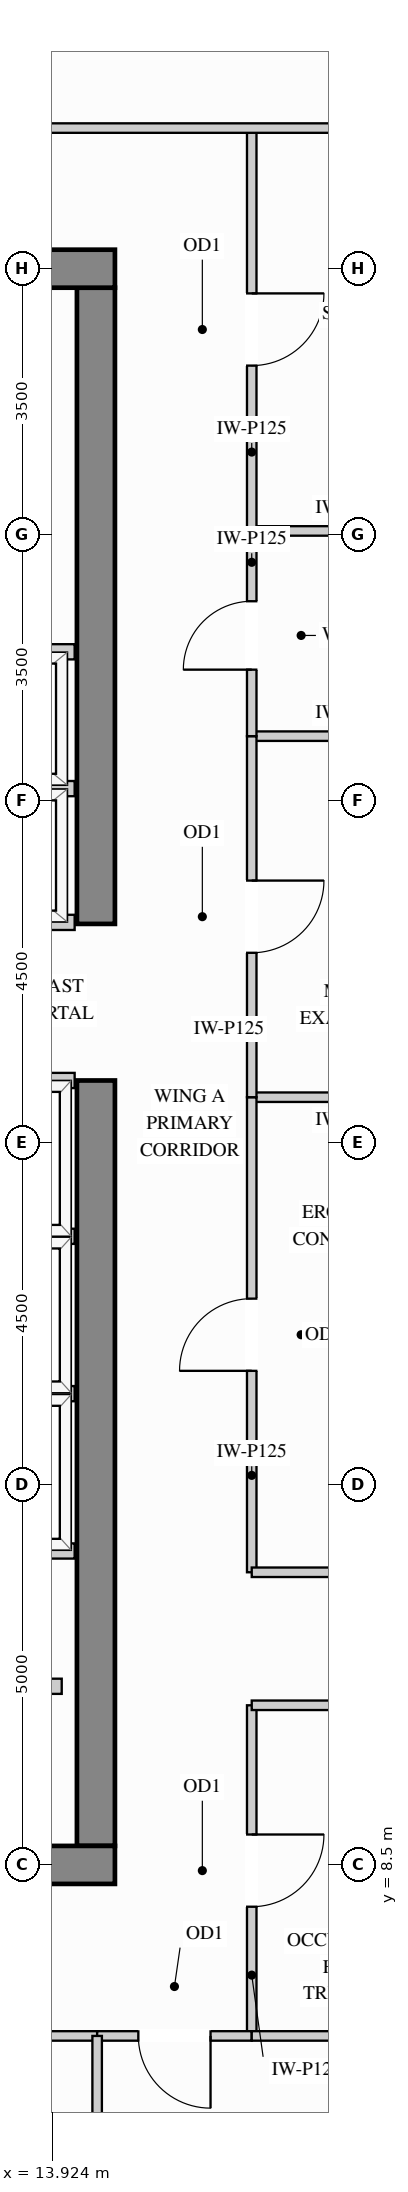
"""IFC4 building model, lengths in metres.
Left out: names, types, materials, properties, quantities, classifications, styles, units other than length and angle.
Written with IfcOpenShell. Run it as: python <this file> out.ifc"""

import sys

from ifc_helpers import new_model, si_unit, direction, frame, frame_2d, origin, place, context, subcontext, project, spatial, rectangle, extrude, source, transform, mapped, element, fill, save


model = new_model("IFC4")
c1 = context("Model", 3, precision=1e-05, world=origin(), true_north=direction((0.0, 1.0)))
c2 = subcontext(c1, "Body", "Model", "MODEL_VIEW")
j1 = project(units=[si_unit("LENGTHUNIT", "METRE"), si_unit("PLANEANGLEUNIT", "RADIAN")], contexts=[c1])
p1 = place(None, origin())
s1 = spatial("IfcSite", under=j1, at=p1, CompositionType="ELEMENT")
p2 = place(p1, origin())
s2 = spatial("IfcBuilding", under=s1, at=p2, CompositionType="ELEMENT")
p3 = place(p2, frame((0.0, 0.0, 226.8)))
s3 = spatial("IfcBuildingStorey", under=s2, at=p3, CompositionType="ELEMENT", Elevation=226.8)
m1 = source(origin(), c2, "Body", "SweptSolid", [
    extrude(rectangle(XDim=10.07, YDim=0.5, at=frame_2d((5.035, 0.0))), origin(), (0.0, 0.0, 1.0), 3.4),
])
p4 = place(p3, frame((14.5, 8.75, 0.0), z_axis=(0.0, 0.0, 1.0), x_axis=(0.0, 1.0, 0.0)))
e1 = element("IfcWall", 1, at=p4, inside=s3, PredefinedType="SHEAR", context=c2, shape_type="MappedRepresentation", body=[
    mapped(m1, transform((0.0, 0.0, 0.0), x_axis=(1.0, 0.0, 0.0), y_axis=(0.0, 1.0, 0.0), z_axis=(0.0, 0.0, 1.0))),
])
m2 = source(origin(), c2, "Body", "SweptSolid", [
    extrude(rectangle(XDim=8.37, YDim=0.5, at=frame_2d((4.185, 0.0))), origin(), (0.0, 0.0, 1.0), 3.4),
])
p5 = place(p3, frame((14.5, 20.88, 0.0), z_axis=(0.0, 0.0, 1.0), x_axis=(0.0, 1.0, 0.0)))
e2 = element("IfcWall", 2, at=p5, inside=s3, PredefinedType="SHEAR", context=c2, shape_type="MappedRepresentation", body=[
    mapped(m2, transform((0.0, 0.0, 0.0), x_axis=(1.0, 0.0, 0.0), y_axis=(0.0, 1.0, 0.0), z_axis=(0.0, 0.0, 1.0))),
])
m3 = source(origin(), c2, "Body", "SweptSolid", [
    extrude(rectangle(XDim=10.5, YDim=0.5, at=frame_2d((5.25, 0.0))), origin(), (0.0, 0.0, 1.0), 3.4),
])
for number, where, z_axis, x_axis in (
    (3, (4.25, 29.5, 0.0), (0.0, 0.0, 1.0), (1.0, 0.0, 0.0)),
    (4, (4.25, 8.5, 0.0), (0.0, 0.0, 1.0), (1.0, 0.0, 0.0)),
):
    element("IfcWall", number, at=place(p3, frame(where, z_axis=z_axis, x_axis=x_axis)), inside=s3, PredefinedType="SHEAR", context=c2, shape_type="MappedRepresentation", body=[
        mapped(m3, transform((0.0, 0.0, 0.0), x_axis=(1.0, 0.0, 0.0), y_axis=(0.0, 1.0, 0.0), z_axis=(0.0, 0.0, 1.0))),
    ])
m4 = source(origin(), c2, "Body", "SweptSolid", [
    extrude(rectangle(XDim=2.598, YDim=0.125, at=frame_2d((1.299, 0.0))), origin(), (0.0, 0.0, 1.0), 3.385),
])
for number, where, z_axis, x_axis in (
    (5, (16.55, 18.6, 0.0), (0.0, 0.0, 1.0), (1.0, 0.0, 0.0)),
    (6, (16.55, 23.35, 0.0), (0.0, 0.0, 1.0), (1.0, 0.0, 0.0)),
    (7, (16.55, 26.05, 0.0), (0.0, 0.0, 1.0), (1.0, 0.0, 0.0)),
):
    element("IfcWall", number, at=place(p3, frame(where, z_axis=z_axis, x_axis=x_axis)), inside=s3, PredefinedType="PARTITIONING", context=c2, shape_type="MappedRepresentation", body=[
        mapped(m4, transform((0.0, 0.0, 0.0), x_axis=(1.0, 0.0, 0.0), y_axis=(0.0, 1.0, 0.0), z_axis=(0.0, 0.0, 1.0))),
    ])
p6 = place(p3, frame((16.55, 12.35, 0.0), z_axis=(0.0, 0.0, 1.0), x_axis=(0.0, 1.0, 0.0)))
e8 = element("IfcWall", 8, at=p6, inside=s3, PredefinedType="PARTITIONING", context=c2, shape_type="SweptSolid", body=[
    extrude(rectangle(XDim=6.25, YDim=0.125, at=frame_2d((3.125, 0.0))), origin(), (0.0, 0.0, 1.0), 3.385),
])
p7 = place(p6, frame((2.65, 0.0, 0.0)))
e9 = element("IfcOpeningElement", 9, at=p7, cuts=e8, PredefinedType="OPENING", context=c2, shape_type="SweptSolid", body=[
    extrude(rectangle(XDim=0.95, YDim=2.15, at=frame_2d((0.475, 1.075))), frame((0.0, 0.073, 0.0), z_axis=(0.0, -1.0, 0.0), x_axis=(1.0, 0.0, 0.0)), (0.0, 0.0, 1.0), 0.145),
])
p8 = place(p3, frame((16.55, 18.6, 0.0), z_axis=(0.0, 0.0, 1.0), x_axis=(0.0, 1.0, 0.0)))
e10 = element("IfcWall", 10, at=p8, inside=s3, PredefinedType="PARTITIONING", context=c2, shape_type="SweptSolid", body=[
    extrude(rectangle(XDim=4.75, YDim=0.125, at=frame_2d((2.375, 0.0))), origin(), (0.0, 0.0, 1.0), 3.385),
])
p9 = place(p8, frame((1.9, 0.0, 0.0)))
e11 = element("IfcOpeningElement", 11, at=p9, cuts=e10, PredefinedType="OPENING", context=c2, shape_type="SweptSolid", body=[
    extrude(rectangle(XDim=0.95, YDim=2.15, at=frame_2d((0.475, 1.075))), frame((0.0, 0.073, 0.0), z_axis=(0.0, -1.0, 0.0), x_axis=(1.0, 0.0, 0.0)), (0.0, 0.0, 1.0), 0.145),
])
p10 = place(p3, frame((16.55, 26.05, 0.0), z_axis=(0.0, 0.0, 1.0), x_axis=(0.0, 1.0, 0.0)))
e12 = element("IfcWall", 12, at=p10, inside=s3, PredefinedType="PARTITIONING", context=c2, shape_type="SweptSolid", body=[
    extrude(rectangle(XDim=5.3, YDim=0.125, at=frame_2d((2.65, 0.0))), origin(), (0.0, 0.0, 1.0), 3.385),
])
p11 = place(p10, frame((2.175, 0.0, 0.0)))
e13 = element("IfcOpeningElement", 13, at=p11, cuts=e12, PredefinedType="OPENING", context=c2, shape_type="SweptSolid", body=[
    extrude(rectangle(XDim=0.95, YDim=2.15, at=frame_2d((0.475, 1.075))), frame((0.0, 0.073, 0.0), z_axis=(0.0, -1.0, 0.0), x_axis=(1.0, 0.0, 0.0)), (0.0, 0.0, 1.0), 0.145),
])
p12 = place(p3, frame((16.55, 6.25, 0.0), z_axis=(0.0, 0.0, 1.0), x_axis=(0.0, 1.0, 0.0)))
e14 = element("IfcWall", 14, at=p12, inside=s3, PredefinedType="PARTITIONING", context=c2, shape_type="SweptSolid", body=[
    extrude(rectangle(XDim=4.35, YDim=0.125, at=frame_2d((2.175, 0.0))), origin(), (0.0, 0.0, 1.0), 3.385),
])
p13 = place(p12, frame((1.7, 0.0, 0.0)))
e15 = element("IfcOpeningElement", 15, at=p13, cuts=e14, PredefinedType="OPENING", context=c2, shape_type="SweptSolid", body=[
    extrude(rectangle(XDim=0.95, YDim=2.15, at=frame_2d((0.475, 1.075))), frame((0.0, 0.073, 0.0), z_axis=(0.0, -1.0, 0.0), x_axis=(1.0, 0.0, 0.0)), (0.0, 0.0, 1.0), 0.145),
])
p14 = place(p3, frame((16.55, 23.35, 0.0), z_axis=(0.0, 0.0, 1.0), x_axis=(0.0, 1.0, 0.0)))
e16 = element("IfcWall", 16, at=p14, inside=s3, PredefinedType="PARTITIONING", context=c2, shape_type="SweptSolid", body=[
    extrude(rectangle(XDim=2.7, YDim=0.125, at=frame_2d((1.35, 0.0))), origin(), (0.0, 0.0, 1.0), 3.385),
])
p15 = place(p14, frame((0.875, 0.0, 0.0)))
e17 = element("IfcOpeningElement", 17, at=p15, cuts=e16, PredefinedType="OPENING", context=c2, shape_type="SweptSolid", body=[
    extrude(rectangle(XDim=0.9, YDim=2.15, at=frame_2d((0.45, 1.075))), frame((0.0, 0.073, 0.0), z_axis=(0.0, -1.0, 0.0), x_axis=(1.0, 0.0, 0.0)), (0.0, 0.0, 1.0), 0.145),
])
m5 = source(origin(), c2, "Body", "SweptSolid", [
    extrude(rectangle(XDim=7.498, YDim=0.125, at=frame_2d((3.749, 0.0))), origin(), (0.0, 0.0, 1.0), 3.385),
])
p16 = place(p3, frame((11.65, 31.35, 0.0), z_axis=(0.0, 0.0, 1.0), x_axis=(1.0, 0.0, 0.0)))
e18 = element("IfcWall", 18, at=p16, inside=s3, PredefinedType="PARTITIONING", context=c2, shape_type="MappedRepresentation", body=[
    mapped(m5, transform((0.0, 0.0, 0.0), x_axis=(1.0, 0.0, 0.0), y_axis=(0.0, 1.0, 0.0), z_axis=(0.0, 0.0, 1.0))),
])
m6 = source(origin(), c2, "Body", "SweptSolid", [
    extrude(rectangle(XDim=2.95, YDim=0.125, at=frame_2d((1.475, 0.0))), origin(), (0.0, 0.0, 1.0), 3.385),
])
for number, where, z_axis, x_axis in (
    (19, (16.55, 12.35, 0.0), (0.0, 0.0, 1.0), (1.0, 0.0, 0.0)),
    (20, (16.55, 10.6, 0.0), (0.0, 0.0, 1.0), (1.0, 0.0, 0.0)),
):
    element("IfcWall", number, at=place(p3, frame(where, z_axis=z_axis, x_axis=x_axis)), inside=s3, PredefinedType="PARTITIONING", context=c2, shape_type="MappedRepresentation", body=[
        mapped(m6, transform((0.0, 0.0, 0.0), x_axis=(1.0, 0.0, 0.0), y_axis=(0.0, 1.0, 0.0), z_axis=(0.0, 0.0, 1.0))),
    ])
p17 = place(p3, frame((8.889, 6.25, 0.0), z_axis=(0.0, 0.0, 1.0), x_axis=(1.0, 0.0, 0.0)))
e21 = element("IfcWall", 21, at=p17, inside=s3, PredefinedType="PARTITIONING", context=c2, shape_type="SweptSolid", body=[
    extrude(rectangle(XDim=5.627, YDim=0.125, at=frame_2d((2.813, 0.0))), origin(), (0.0, 0.0, 1.0), 2.848),
])
p18 = place(p17, frame((2.338, 0.0, 0.0)))
e22 = element("IfcOpeningElement", 22, at=p18, cuts=e21, PredefinedType="OPENING", context=c2, shape_type="SweptSolid", body=[
    extrude(rectangle(XDim=0.95, YDim=2.15, at=frame_2d((0.475, 1.075))), frame((0.0, 0.073, 0.0), z_axis=(0.0, -1.0, 0.0), x_axis=(1.0, 0.0, 0.0)), (0.0, 0.0, 1.0), 0.145),
])
p19 = place(p3, frame((14.516, 6.25, 0.0), z_axis=(0.0, 0.0, 1.0), x_axis=(1.0, 0.0, 0.0)))
e23 = element("IfcWall", 23, at=p19, inside=s3, PredefinedType="PARTITIONING", context=c2, shape_type="SweptSolid", body=[
    extrude(rectangle(XDim=2.034, YDim=0.125, at=frame_2d((1.017, 0.0))), origin(), (0.0, 0.0, 1.0), 2.848),
])
p20 = place(p19, frame((0.542, 0.0, 0.0)))
e24 = element("IfcOpeningElement", 24, at=p20, cuts=e23, PredefinedType="OPENING", context=c2, shape_type="SweptSolid", body=[
    extrude(rectangle(XDim=0.95, YDim=2.15, at=frame_2d((0.475, 1.075))), frame((0.0, 0.073, 0.0), z_axis=(0.0, -1.0, 0.0), x_axis=(1.0, 0.0, 0.0)), (0.0, 0.0, 1.0), 0.145),
])
m7 = source(origin(), c2, "Body", "SweptSolid", [
    extrude(rectangle(XDim=2.598, YDim=0.125, at=frame_2d((1.299, 0.0))), origin(), (0.0, 0.0, 1.0), 2.848),
])
p21 = place(p3, frame((16.55, 6.25, 0.0), z_axis=(0.0, 0.0, 1.0), x_axis=(1.0, 0.0, 0.0)))
e25 = element("IfcWall", 25, at=p21, inside=s3, PredefinedType="PARTITIONING", context=c2, shape_type="MappedRepresentation", body=[
    mapped(m7, transform((0.0, 0.0, 0.0), x_axis=(1.0, 0.0, 0.0), y_axis=(0.0, 1.0, 0.0), z_axis=(0.0, 0.0, 1.0))),
])
m8 = source(origin(), c2, "Body", "SweptSolid", [
    extrude(rectangle(XDim=5.2, YDim=0.125, at=frame_2d((2.6, 0.0))), origin(), (0.0, 0.0, 1.0), 3.385),
])
p22 = place(p3, frame((14.516, 1.05, 0.0), z_axis=(0.0, 0.0, 1.0), x_axis=(0.0, 1.0, 0.0)))
e26 = element("IfcWall", 26, at=p22, inside=s3, PredefinedType="PARTITIONING", context=c2, shape_type="MappedRepresentation", body=[
    mapped(m8, transform((0.0, 0.0, 0.0), x_axis=(1.0, 0.0, 0.0), y_axis=(0.0, 1.0, 0.0), z_axis=(0.0, 0.0, 1.0))),
])
m9 = source(origin(), c2, "Body", "SweptSolid", [
    extrude(rectangle(XDim=1.63, YDim=0.2, at=frame_2d((0.815, 0.0))), origin(), (0.0, 0.0, 1.0), 3.385),
])
p23 = place(p3, frame((12.42, 10.85, 0.0), z_axis=(0.0, 0.0, 1.0), x_axis=(1.0, 0.0, 0.0)))
e27 = element("IfcWall", 27, at=p23, inside=s3, PredefinedType="PARTITIONING", context=c2, shape_type="MappedRepresentation", body=[
    mapped(m9, transform((0.0, 0.0, 0.0), x_axis=(1.0, 0.0, 0.0), y_axis=(0.0, 1.0, 0.0), z_axis=(0.0, 0.0, 1.0))),
])
m10 = source(origin(), c2, "Body", "SweptSolid", [
    extrude(rectangle(XDim=2.39, YDim=0.2, at=frame_2d((1.195, 0.0))), origin(), (0.0, 0.0, 1.0), 3.385),
])
for number, where, z_axis, x_axis in (
    (28, (11.83, 22.66, 0.0), (0.0, 0.0, 1.0), (1.0, 0.0, 0.0)),
    (29, (11.83, 20.9, 0.0), (0.0, 0.0, 1.0), (1.0, 0.0, 0.0)),
    (30, (11.83, 24.46, 0.0), (0.0, 0.0, 1.0), (1.0, 0.0, 0.0)),
):
    element("IfcWall", number, at=place(p3, frame(where, z_axis=z_axis, x_axis=x_axis)), inside=s3, PredefinedType="PARTITIONING", context=c2, shape_type="MappedRepresentation", body=[
        mapped(m10, transform((0.0, 0.0, 0.0), x_axis=(1.0, 0.0, 0.0), y_axis=(0.0, 1.0, 0.0), z_axis=(0.0, 0.0, 1.0))),
    ])
m11 = source(origin(), c2, "Body", "SweptSolid", [
    extrude(rectangle(XDim=1.99, YDim=0.2, at=frame_2d((0.995, 0.0))), origin(), (0.0, 0.0, 1.0), 3.385),
])
for number, where, z_axis, x_axis in (
    (31, (12.23, 14.7, 0.0), (0.0, 0.0, 1.0), (1.0, 0.0, 0.0)),
    (32, (12.23, 12.63, 0.0), (0.0, 0.0, 1.0), (1.0, 0.0, 0.0)),
    (33, (12.23, 16.77, 0.0), (0.0, 0.0, 1.0), (1.0, 0.0, 0.0)),
    (34, (12.23, 18.82, 0.0), (0.0, 0.0, 1.0), (1.0, 0.0, 0.0)),
):
    element("IfcWall", number, at=place(p3, frame(where, z_axis=z_axis, x_axis=x_axis)), inside=s3, PredefinedType="PARTITIONING", context=c2, shape_type="MappedRepresentation", body=[
        mapped(m11, transform((0.0, 0.0, 0.0), x_axis=(1.0, 0.0, 0.0), y_axis=(0.0, 1.0, 0.0), z_axis=(0.0, 0.0, 1.0))),
    ])
m12 = source(origin(), c2, "Body", "SweptSolid", [
    extrude(rectangle(XDim=0.95, YDim=2.15, at=frame_2d((0.475, 1.075))), frame((0.0, 0.025, 0.0), z_axis=(0.0, -1.0, 0.0), x_axis=(1.0, 0.0, 0.0)), (0.0, 0.0, 1.0), 0.05),
])
p24 = place(p13, origin())
e35 = element("IfcDoor", 35, at=p24, inside=s3, OperationType="SINGLE_SWING_RIGHT", PredefinedType="DOOR", context=c2, shape_type="MappedRepresentation", body=[
    mapped(m12, transform((0.0, 0.0, 0.0), x_axis=(1.0, 0.0, 0.0), y_axis=(0.0, 1.0, 0.0), z_axis=(0.0, 0.0, 1.0))),
])
fill(e15, e35)
p25 = place(p7, origin())
e36 = element("IfcDoor", 36, at=p25, inside=s3, OperationType="SINGLE_SWING_LEFT", PredefinedType="DOOR", context=c2, shape_type="MappedRepresentation", body=[
    mapped(m12, transform((0.0, 0.0, 0.0), x_axis=(1.0, 0.0, 0.0), y_axis=(0.0, 1.0, 0.0), z_axis=(0.0, 0.0, 1.0))),
])
fill(e9, e36)
p26 = place(p9, origin())
e37 = element("IfcDoor", 37, at=p26, inside=s3, OperationType="SINGLE_SWING_RIGHT", PredefinedType="DOOR", context=c2, shape_type="MappedRepresentation", body=[
    mapped(m12, transform((0.0, 0.0, 0.0), x_axis=(1.0, 0.0, 0.0), y_axis=(0.0, 1.0, 0.0), z_axis=(0.0, 0.0, 1.0))),
])
fill(e11, e37)
p27 = place(p11, origin())
e38 = element("IfcDoor", 38, at=p27, inside=s3, OperationType="SINGLE_SWING_RIGHT", PredefinedType="DOOR", context=c2, shape_type="MappedRepresentation", body=[
    mapped(m12, transform((0.0, 0.0, 0.0), x_axis=(1.0, 0.0, 0.0), y_axis=(0.0, 1.0, 0.0), z_axis=(0.0, 0.0, 1.0))),
])
fill(e13, e38)
p28 = place(p20, origin())
e39 = element("IfcDoor", 39, at=p28, inside=s3, OperationType="SINGLE_SWING_RIGHT", PredefinedType="DOOR", context=c2, shape_type="MappedRepresentation", body=[
    mapped(m12, transform((0.0, 0.0, 0.0), x_axis=(1.0, 0.0, 0.0), y_axis=(0.0, 1.0, 0.0), z_axis=(0.0, 0.0, 1.0))),
])
fill(e24, e39)
m13 = source(origin(), c2, "Body", "SweptSolid", [
    extrude(rectangle(XDim=0.9, YDim=2.15, at=frame_2d((0.45, 1.075))), frame((0.0, 0.025, 0.0), z_axis=(0.0, -1.0, 0.0), x_axis=(1.0, 0.0, 0.0)), (0.0, 0.0, 1.0), 0.05),
])
p29 = place(p15, origin())
e40 = element("IfcDoor", 40, at=p29, inside=s3, OperationType="SINGLE_SWING_LEFT", PredefinedType="DOOR", context=c2, shape_type="MappedRepresentation", body=[
    mapped(m13, transform((0.0, 0.0, 0.0), x_axis=(1.0, 0.0, 0.0), y_axis=(0.0, 1.0, 0.0), z_axis=(0.0, 0.0, 1.0))),
])
fill(e17, e40)
save(model, sys.argv[1])
